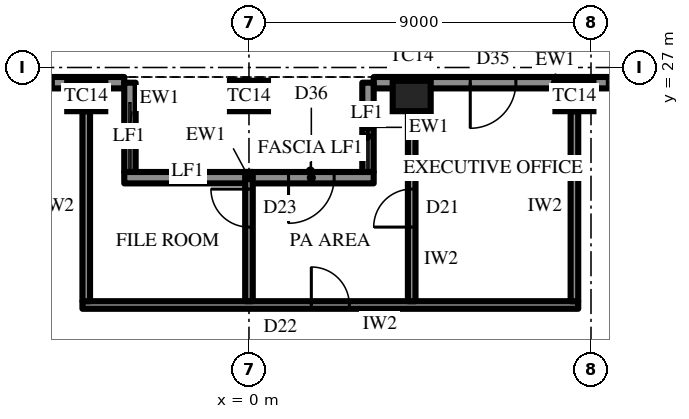
"""IFC4 building model, lengths in metres.
Left out: names, types, materials, properties, quantities, classifications, styles, units other than length and angle.
Written with IfcOpenShell. Run it as: python <this file> out.ifc"""

import sys

from ifc_helpers import new_model, si_unit, direction, frame, frame_2d, origin, origin_2d, place, context, subcontext, project, spatial, rectangle, extrude, element, fill, save


model = new_model("IFC4")
c1 = context("Model", 3, precision=1e-05, world=origin(), true_north=direction((0.0, 1.0)))
c2 = subcontext(c1, "Body", "Model", "MODEL_VIEW")
j1 = project(units=[si_unit("LENGTHUNIT", "METRE"), si_unit("PLANEANGLEUNIT", "RADIAN")], contexts=[c1])
p1 = place(None, origin())
s1 = spatial("IfcSite", under=j1, at=p1, CompositionType="ELEMENT")
p2 = place(p1, origin())
s2 = spatial("IfcBuilding", under=s1, at=p2, CompositionType="ELEMENT")
p3 = place(p2, frame((0.0, 0.0, 332.5)))
s3 = spatial("IfcBuildingStorey", under=s2, at=p3, CompositionType="ELEMENT", Elevation=332.5)
for number, where, z_axis, x_axis in (
    (1, (8.564, 26.25, 0.0), (0.0, 0.0, 1.0), (-1.0, 0.0, 0.0)),
    (2, (4.282, 26.25, 0.0), (0.0, 0.0, 1.0), (-1.0, 0.0, 0.0)),
    (3, (0.0, 26.25, 0.0), (0.0, 0.0, 1.0), (-1.0, 0.0, 0.0)),
    (4, (-4.282, 26.25, 0.0), (0.0, 0.0, 1.0), (-1.0, 0.0, 0.0)),
):
    element("IfcColumn", number, at=place(p3, frame(where, z_axis=z_axis, x_axis=x_axis)), inside=s3, PredefinedType="COLUMN", context=c2, shape_type="SweptSolid", body=[
        extrude(rectangle(XDim=1.0, YDim=0.8, at=origin_2d()), origin(), (0.0, 0.0, 1.0), 4.2),
    ])
p4 = place(p3, frame((12.846, 26.6, 0.0), z_axis=(0.0, 0.0, 1.0), x_axis=(-1.0, 0.0, 0.0)))
e5 = element("IfcWall", 5, at=p4, inside=s3, PredefinedType="SOLIDWALL", context=c2, shape_type="SweptSolid", body=[
    extrude(rectangle(XDim=9.564, YDim=0.3, at=frame_2d((4.782, 0.0))), origin(), (0.0, 0.0, 1.0), 2.9),
])
p5 = place(p4, frame((0.866, 0.0, 0.6)))
e6 = element("IfcOpeningElement", 6, at=p5, cuts=e5, PredefinedType="OPENING", context=c2, shape_type="SweptSolid", body=[
    extrude(rectangle(XDim=2.55, YDim=2.05, at=frame_2d((1.275, 1.025))), frame((0.0, 0.16, 0.0), z_axis=(0.0, -1.0, 0.0), x_axis=(1.0, 0.0, 0.0)), (0.0, 0.0, 1.0), 0.32),
])
p6 = place(p4, frame((5.823, 0.0, 0.0)))
e7 = element("IfcOpeningElement", 7, at=p6, cuts=e5, PredefinedType="OPENING", context=c2, shape_type="SweptSolid", body=[
    extrude(rectangle(XDim=1.2, YDim=2.4, at=frame_2d((0.6, 1.2))), frame((0.0, 0.16, 0.0), z_axis=(0.0, -1.0, 0.0), x_axis=(1.0, 0.0, 0.0)), (0.0, 0.0, 1.0), 0.32),
])
p7 = place(p3, frame((-3.282, 26.6, 0.0), z_axis=(0.0, 0.0, 1.0), x_axis=(-1.0, 0.0, 0.0)))
e8 = element("IfcWall", 8, at=p7, inside=s3, PredefinedType="SOLIDWALL", context=c2, shape_type="SweptSolid", body=[
    extrude(rectangle(XDim=9.564, YDim=0.3, at=frame_2d((4.782, 0.0))), origin(), (0.0, 0.0, 1.0), 2.9),
])
p8 = place(p7, frame((1.866, 0.0, 0.6)))
e9 = element("IfcOpeningElement", 9, at=p8, cuts=e8, PredefinedType="OPENING", context=c2, shape_type="SweptSolid", body=[
    extrude(rectangle(XDim=2.55, YDim=2.05, at=frame_2d((1.275, 1.025))), frame((0.0, 0.16, 0.0), z_axis=(0.0, -1.0, 0.0), x_axis=(1.0, 0.0, 0.0)), (0.0, 0.0, 1.0), 0.32),
])
p9 = place(p7, frame((6.148, 0.0, 0.6)))
e10 = element("IfcOpeningElement", 10, at=p9, cuts=e8, PredefinedType="OPENING", context=c2, shape_type="SweptSolid", body=[
    extrude(rectangle(XDim=2.55, YDim=2.05, at=frame_2d((1.275, 1.025))), frame((0.0, 0.16, 0.0), z_axis=(0.0, -1.0, 0.0), x_axis=(1.0, 0.0, 0.0)), (0.0, 0.0, 1.0), 0.32),
])
for number, where, z_axis, x_axis in (
    (11, (3.132, 26.6, 0.0), (0.0, 0.0, 1.0), (0.0, -1.0, 0.0)),
    (12, (-3.132, 26.6, 0.0), (0.0, 0.0, 1.0), (0.0, -1.0, 0.0)),
):
    element("IfcWall", number, at=place(p3, frame(where, z_axis=z_axis, x_axis=x_axis)), inside=s3, PredefinedType="SOLIDWALL", context=c2, shape_type="SweptSolid", body=[
        extrude(rectangle(XDim=2.35, YDim=0.3, at=frame_2d((1.175, 0.0))), origin(), (0.0, 0.0, 1.0), 2.9),
    ])
p10 = place(p3, frame((3.282, 24.1, 0.0), z_axis=(0.0, 0.0, 1.0), x_axis=(-1.0, 0.0, 0.0)))
e13 = element("IfcWall", 13, at=p10, inside=s3, PredefinedType="SOLIDWALL", context=c2, shape_type="SweptSolid", body=[
    extrude(rectangle(XDim=6.564, YDim=0.3, at=frame_2d((3.282, 0.0))), origin(), (0.0, 0.0, 1.0), 2.9),
])
p11 = place(p10, frame((1.041, 0.0, 0.0)))
e14 = element("IfcOpeningElement", 14, at=p11, cuts=e13, PredefinedType="OPENING", context=c2, shape_type="SweptSolid", body=[
    extrude(rectangle(XDim=1.2, YDim=2.4, at=frame_2d((0.6, 1.2))), frame((0.0, 0.16, 0.0), z_axis=(0.0, -1.0, 0.0), x_axis=(1.0, 0.0, 0.0)), (0.0, 0.0, 1.0), 0.32),
])
p12 = place(p3, frame((8.664, 20.75, 0.0), z_axis=(0.0, 0.0, 1.0), x_axis=(-1.0, 0.0, 0.0)))
e15 = element("IfcWall", 15, at=p12, inside=s3, PredefinedType="PARTITIONING", context=c2, shape_type="SweptSolid", body=[
    extrude(rectangle(XDim=13.046, YDim=0.2, at=frame_2d((6.523, 0.0))), origin(), (0.0, 0.0, 1.0), 4.0),
])
p13 = place(p12, frame((6.023, 0.0, 0.0)))
e16 = element("IfcOpeningElement", 16, at=p13, cuts=e15, PredefinedType="OPENING", context=c2, shape_type="SweptSolid", body=[
    extrude(rectangle(XDim=1.0, YDim=2.2, at=frame_2d((0.5, 1.1))), frame((0.0, 0.11, 0.0), z_axis=(0.0, -1.0, 0.0), x_axis=(1.0, 0.0, 0.0)), (0.0, 0.0, 1.0), 0.22),
])
p14 = place(p3, frame((8.564, 20.85, 0.0), z_axis=(0.0, 0.0, 1.0), x_axis=(0.0, 1.0, 0.0)))
e17 = element("IfcWall", 17, at=p14, inside=s3, PredefinedType="PARTITIONING", context=c2, shape_type="SweptSolid", body=[
    extrude(rectangle(XDim=5.0, YDim=0.2, at=frame_2d((2.5, 0.0))), origin(), (0.0, 0.0, 1.0), 2.992),
])
p15 = place(p3, frame((4.282, 20.85, 0.0), z_axis=(0.0, 0.0, 1.0), x_axis=(0.0, 1.0, 0.0)))
e18 = element("IfcWall", 18, at=p15, inside=s3, PredefinedType="PARTITIONING", context=c2, shape_type="SweptSolid", body=[
    extrude(rectangle(XDim=5.0, YDim=0.2, at=frame_2d((2.5, 0.0))), origin(), (0.0, 0.0, 1.0), 2.992),
])
p16 = place(p15, frame((1.95, 0.0, 0.0)))
e19 = element("IfcOpeningElement", 19, at=p16, cuts=e18, PredefinedType="OPENING", context=c2, shape_type="SweptSolid", body=[
    extrude(rectangle(XDim=1.0, YDim=2.2, at=frame_2d((0.5, 1.1))), frame((0.0, 0.11, 0.0), z_axis=(0.0, -1.0, 0.0), x_axis=(1.0, 0.0, 0.0)), (0.0, 0.0, 1.0), 0.22),
])
p17 = place(p3, frame((0.0, 20.85, 0.0), z_axis=(0.0, 0.0, 1.0), x_axis=(0.0, 1.0, 0.0)))
e20 = element("IfcWall", 20, at=p17, inside=s3, PredefinedType="PARTITIONING", context=c2, shape_type="SweptSolid", body=[
    extrude(rectangle(XDim=3.401, YDim=0.2, at=frame_2d((1.7, 0.0))), origin(), (0.0, 0.0, 1.0), 2.992),
])
p18 = place(p17, frame((1.95, 0.0, 0.0)))
e21 = element("IfcOpeningElement", 21, at=p18, cuts=e20, PredefinedType="OPENING", context=c2, shape_type="SweptSolid", body=[
    extrude(rectangle(XDim=1.0, YDim=2.2, at=frame_2d((0.5, 1.1))), frame((0.0, 0.11, 0.0), z_axis=(0.0, -1.0, 0.0), x_axis=(1.0, 0.0, 0.0)), (0.0, 0.0, 1.0), 0.22),
])
p19 = place(p3, frame((-4.282, 20.85, 0.0), z_axis=(0.0, 0.0, 1.0), x_axis=(0.0, 1.0, 0.0)))
e22 = element("IfcWall", 22, at=p19, inside=s3, PredefinedType="PARTITIONING", context=c2, shape_type="SweptSolid", body=[
    extrude(rectangle(XDim=5.0, YDim=0.2, at=frame_2d((2.5, 0.0))), origin(), (0.0, 0.0, 1.0), 2.992),
])
p20 = place(p5, origin())
e23 = element("IfcWindow", 23, at=p20, inside=s3, PartitioningType="SINGLE_PANEL", PredefinedType="WINDOW", context=c2, shape_type="SweptSolid", body=[
    extrude(rectangle(XDim=2.55, YDim=2.05, at=frame_2d((1.275, 1.025))), frame((0.0, 0.03, 0.0), z_axis=(0.0, -1.0, 0.0), x_axis=(1.0, 0.0, 0.0)), (0.0, 0.0, 1.0), 0.06),
])
fill(e6, e23)
p21 = place(p6, origin())
e24 = element("IfcDoor", 24, at=p21, inside=s3, OperationType="SINGLE_SWING_LEFT", PredefinedType="DOOR", context=c2, shape_type="SweptSolid", body=[
    extrude(rectangle(XDim=1.2, YDim=2.4, at=frame_2d((0.6, 1.2))), frame((0.0, 0.025, 0.0), z_axis=(0.0, -1.0, 0.0), x_axis=(1.0, 0.0, 0.0)), (0.0, 0.0, 1.0), 0.05),
])
fill(e7, e24)
p22 = place(p8, origin())
e25 = element("IfcWindow", 25, at=p22, inside=s3, PartitioningType="SINGLE_PANEL", PredefinedType="WINDOW", context=c2, shape_type="SweptSolid", body=[
    extrude(rectangle(XDim=2.55, YDim=2.05, at=frame_2d((1.275, 1.025))), frame((0.0, 0.03, 0.0), z_axis=(0.0, -1.0, 0.0), x_axis=(1.0, 0.0, 0.0)), (0.0, 0.0, 1.0), 0.06),
])
fill(e9, e25)
p23 = place(p11, origin())
e26 = element("IfcDoor", 26, at=p23, inside=s3, OperationType="SINGLE_SWING_LEFT", PredefinedType="DOOR", context=c2, shape_type="SweptSolid", body=[
    extrude(rectangle(XDim=1.2, YDim=2.4, at=frame_2d((0.6, 1.2))), frame((0.0, 0.025, 0.0), z_axis=(0.0, -1.0, 0.0), x_axis=(1.0, 0.0, 0.0)), (0.0, 0.0, 1.0), 0.05),
])
fill(e14, e26)
p24 = place(p16, origin())
e27 = element("IfcDoor", 27, at=p24, inside=s3, OperationType="SINGLE_SWING_RIGHT", PredefinedType="DOOR", context=c2, shape_type="SweptSolid", body=[
    extrude(rectangle(XDim=1.0, YDim=2.2, at=frame_2d((0.5, 1.1))), frame((0.0, 0.025, 0.0), z_axis=(0.0, -1.0, 0.0), x_axis=(1.0, 0.0, 0.0)), (0.0, 0.0, 1.0), 0.05),
])
fill(e19, e27)
p25 = place(p13, frame((1.0, 0.0, 0.0), z_axis=(0.0, 0.0, 1.0), x_axis=(-1.0, 0.0, 0.0)))
e28 = element("IfcDoor", 28, at=p25, inside=s3, OperationType="SINGLE_SWING_RIGHT", PredefinedType="DOOR", context=c2, shape_type="SweptSolid", body=[
    extrude(rectangle(XDim=1.0, YDim=2.2, at=frame_2d((0.5, 1.1))), frame((0.0, 0.025, 0.0), z_axis=(0.0, -1.0, 0.0), x_axis=(1.0, 0.0, 0.0)), (0.0, 0.0, 1.0), 0.05),
])
fill(e16, e28)
p26 = place(p18, origin())
e29 = element("IfcDoor", 29, at=p26, inside=s3, OperationType="SINGLE_SWING_LEFT", PredefinedType="DOOR", context=c2, shape_type="SweptSolid", body=[
    extrude(rectangle(XDim=1.0, YDim=2.2, at=frame_2d((0.5, 1.1))), frame((0.0, 0.025, 0.0), z_axis=(0.0, -1.0, 0.0), x_axis=(1.0, 0.0, 0.0)), (0.0, 0.0, 1.0), 0.05),
])
fill(e21, e29)
save(model, sys.argv[1])
